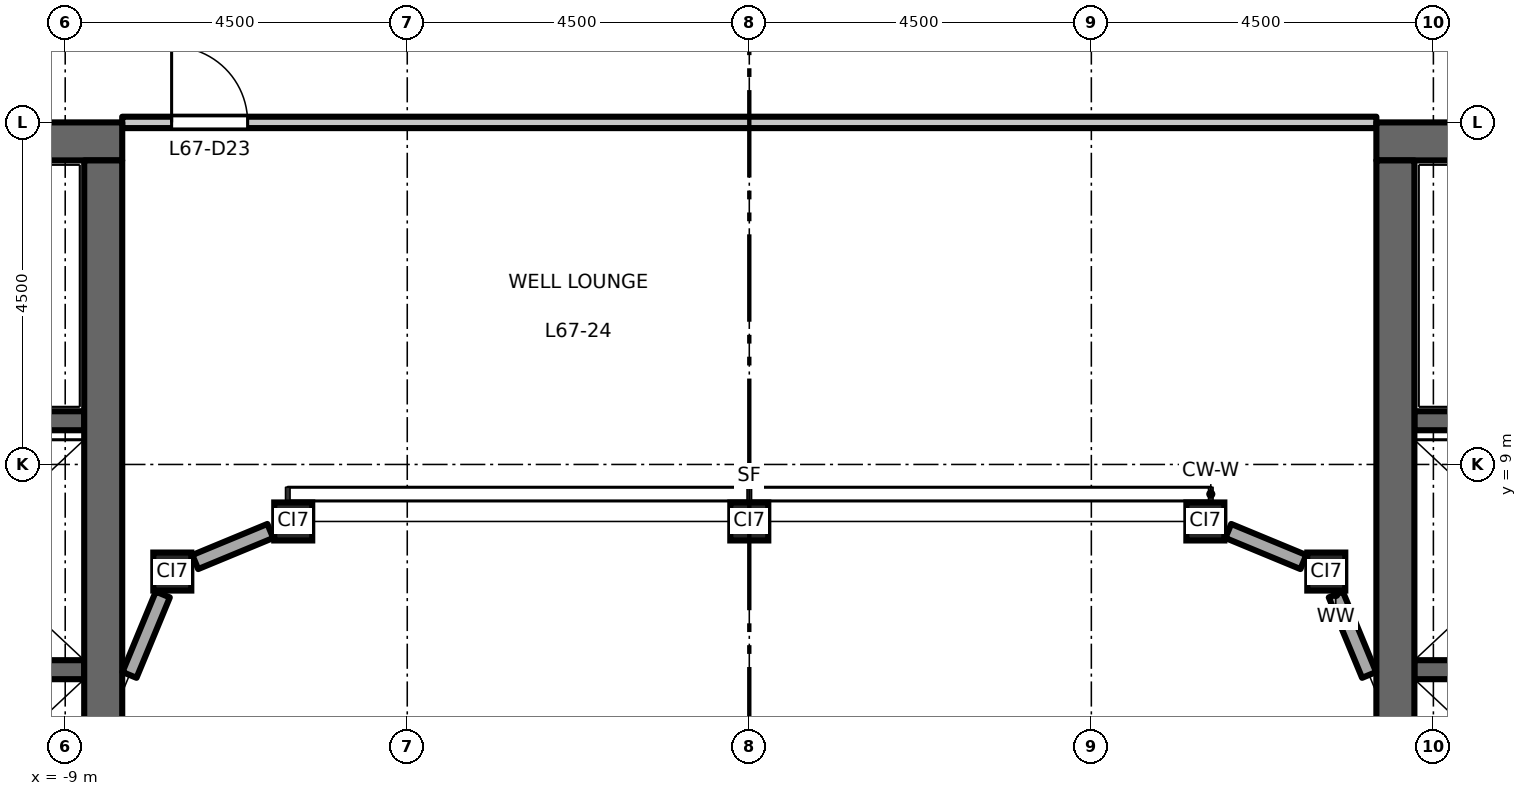
"""IFC4 building model, lengths in metres.
Left out: names, types, materials, properties, quantities, classifications, styles, units other than length and angle.
Written with IfcOpenShell. Run it as: python <this file> out.ifc"""

import sys

from ifc_helpers import new_model, si_unit, direction, frame, frame_2d, origin, origin_2d, place, context, subcontext, project, spatial, rectangle, hollow_rectangle, extrude, element, fill, save


model = new_model("IFC4")
c1 = context("Model", 3, precision=1e-05, world=origin(), true_north=direction((0.0, 1.0)))
c2 = subcontext(c1, "Body", "Model", "MODEL_VIEW")
j1 = project(units=[si_unit("LENGTHUNIT", "METRE"), si_unit("PLANEANGLEUNIT", "RADIAN")], contexts=[c1])
p1 = place(None, origin())
s1 = spatial("IfcSite", under=j1, at=p1, CompositionType="ELEMENT")
p2 = place(p1, origin())
s2 = spatial("IfcBuilding", under=s1, at=p2, CompositionType="ELEMENT")
p3 = place(p2, frame((0.0, 0.0, 312.2)))
s3 = spatial("IfcBuildingStorey", under=s2, at=p3, CompositionType="ELEMENT", Elevation=312.2)
for number, where, z_axis, x_axis in (
    (1, (-7.591, 7.591, 0.0), (0.0, 0.0, 1.0), (1.0, 0.0, 0.0)),
    (2, (-6.0, 8.25, 0.0), (0.0, 0.0, 1.0), (1.0, 0.0, 0.0)),
    (3, (0.0, 8.25, 0.0), (0.0, 0.0, 1.0), (1.0, 0.0, 0.0)),
    (4, (6.0, 8.25, 0.0), (0.0, 0.0, 1.0), (1.0, 0.0, 0.0)),
    (5, (7.591, 7.591, 0.0), (0.0, 0.0, 1.0), (1.0, 0.0, 0.0)),
):
    element("IfcColumn", number, at=place(p3, frame(where, z_axis=z_axis, x_axis=x_axis)), inside=s3, PredefinedType="COLUMN", context=c2, shape_type="SweptSolid", body=[
        extrude(hollow_rectangle(XDim=0.5, YDim=0.5, WallThickness=0.025, at=origin_2d()), origin(), (0.0, 0.0, 1.0), 4.5),
    ])
p4 = place(p3, frame((-8.75, 6.3, 0.0), z_axis=(0.0, 0.0, 1.0), x_axis=(-1.0, 0.0, 0.0)))
e6 = element("IfcWall", 6, at=p4, inside=s3, PredefinedType="SHEAR", context=c2, shape_type="SweptSolid", body=[
    extrude(rectangle(XDim=3.1, YDim=0.25, at=frame_2d((1.55, 0.0))), origin(), (0.0, 0.0, 1.0), 4.35),
])
p5 = place(p3, frame((-8.75, 9.575, 0.0), z_axis=(0.0, 0.0, 1.0), x_axis=(-1.0, 0.0, 0.0)))
e7 = element("IfcWall", 7, at=p5, inside=s3, PredefinedType="SHEAR", context=c2, shape_type="SweptSolid", body=[
    extrude(rectangle(XDim=8.0, YDim=0.25, at=frame_2d((4.0, 0.0))), origin(), (0.0, 0.0, 1.0), 4.35),
])
p6 = place(p5, frame((6.65, 0.0, 0.0)))
e8 = element("IfcOpeningElement", 8, at=p6, cuts=e7, PredefinedType="OPENING", context=c2, shape_type="SweptSolid", body=[
    extrude(rectangle(XDim=1.1, YDim=2.1, at=frame_2d((0.55, 1.05))), frame((0.0, 0.135, 0.0), z_axis=(0.0, -1.0, 0.0), x_axis=(1.0, 0.0, 0.0)), (0.0, 0.0, 1.0), 0.27),
])
p7 = place(p3, frame((-8.25, 13.25, 0.0), z_axis=(0.0, 0.0, 1.0), x_axis=(-1.0, 0.0, 0.0)))
e9 = element("IfcWall", 9, at=p7, inside=s3, PredefinedType="SHEAR", context=c2, shape_type="SweptSolid", body=[
    extrude(rectangle(XDim=9.0, YDim=0.5, at=frame_2d((4.5, 0.0))), origin(), (0.0, 0.0, 1.0), 4.35),
])
p8 = place(p3, frame((-8.5, -13.0, 0.0), z_axis=(0.0, 0.0, 1.0), x_axis=(0.0, 1.0, 0.0)))
e10 = element("IfcWall", 10, at=p8, inside=s3, PredefinedType="SHEAR", context=c2, shape_type="SweptSolid", body=[
    extrude(rectangle(XDim=26.0, YDim=0.5, at=frame_2d((13.0, 0.0))), origin(), (0.0, 0.0, 1.0), 4.35),
])
p9 = place(p3, frame((8.75, 6.3, 0.0), z_axis=(0.0, 0.0, 1.0), x_axis=(1.0, 0.0, 0.0)))
e11 = element("IfcWall", 11, at=p9, inside=s3, PredefinedType="SHEAR", context=c2, shape_type="SweptSolid", body=[
    extrude(rectangle(XDim=3.1, YDim=0.25, at=frame_2d((1.55, 0.0))), origin(), (0.0, 0.0, 1.0), 4.35),
])
p10 = place(p3, frame((8.75, 9.575, 0.0), z_axis=(0.0, 0.0, 1.0), x_axis=(1.0, 0.0, 0.0)))
e12 = element("IfcWall", 12, at=p10, inside=s3, PredefinedType="SHEAR", context=c2, shape_type="SweptSolid", body=[
    extrude(rectangle(XDim=8.0, YDim=0.25, at=frame_2d((4.0, 0.0))), origin(), (0.0, 0.0, 1.0), 4.35),
])
p11 = place(p10, frame((6.65, 0.0, 0.0)))
e13 = element("IfcOpeningElement", 13, at=p11, cuts=e12, PredefinedType="OPENING", context=c2, shape_type="SweptSolid", body=[
    extrude(rectangle(XDim=1.1, YDim=2.1, at=frame_2d((0.55, 1.05))), frame((0.0, 0.135, 0.0), z_axis=(0.0, -1.0, 0.0), x_axis=(1.0, 0.0, 0.0)), (0.0, 0.0, 1.0), 0.27),
])
p12 = place(p3, frame((8.25, 13.25, 0.0), z_axis=(0.0, 0.0, 1.0), x_axis=(1.0, 0.0, 0.0)))
e14 = element("IfcWall", 14, at=p12, inside=s3, PredefinedType="SHEAR", context=c2, shape_type="SweptSolid", body=[
    extrude(rectangle(XDim=9.0, YDim=0.5, at=frame_2d((4.5, 0.0))), origin(), (0.0, 0.0, 1.0), 4.35),
])
p13 = place(p3, frame((8.5, -13.0, 0.0), z_axis=(0.0, 0.0, 1.0), x_axis=(0.0, 1.0, 0.0)))
e15 = element("IfcWall", 15, at=p13, inside=s3, PredefinedType="SHEAR", context=c2, shape_type="SweptSolid", body=[
    extrude(rectangle(XDim=26.0, YDim=0.5, at=frame_2d((13.0, 0.0))), origin(), (0.0, 0.0, 1.0), 4.35),
])
p14 = place(p3, frame((8.154, 6.231, 0.0), z_axis=(0.0, 0.0, 1.0), x_axis=(-0.382571404949, 0.923925927829, 0.0)))
e16 = element("IfcWall", 16, at=p14, inside=s3, PredefinedType="STANDARD", context=c2, shape_type="SweptSolid", body=[
    extrude(rectangle(XDim=1.146, YDim=0.2, at=frame_2d((0.573, 0.0))), origin(), (0.0, 0.0, 1.0), 4.01),
])
for number, where, z_axis, x_axis in (
    (17, (7.289, 7.716, 0.0), (0.0, 0.0, 1.0), (-0.924, 0.383, 0.0)),
    (18, (-6.302, 8.125, 0.0), (0.0, 0.0, 1.0), (-0.924, -0.383, 0.0)),
):
    element("IfcWall", number, at=place(p3, frame(where, z_axis=z_axis, x_axis=x_axis)), inside=s3, PredefinedType="STANDARD", context=c2, shape_type="SweptSolid", body=[
        extrude(rectangle(XDim=1.069, YDim=0.2, at=frame_2d((0.534, 0.0))), origin(), (0.0, 0.0, 1.0), 4.01),
    ])
p15 = place(p3, frame((-7.716, 7.289, 0.0), z_axis=(0.0, 0.0, 1.0), x_axis=(-0.382571404949, -0.923925927829, 0.0)))
e19 = element("IfcWall", 19, at=p15, inside=s3, PredefinedType="STANDARD", context=c2, shape_type="SweptSolid", body=[
    extrude(rectangle(XDim=1.146, YDim=0.2, at=frame_2d((0.573, 0.0))), origin(), (0.0, 0.0, 1.0), 4.01),
])
p16 = place(p3, frame((-8.25, 13.5, 0.0), z_axis=(0.0, 0.0, 1.0), x_axis=(1.0, 0.0, 0.0)))
e20 = element("IfcWall", 20, at=p16, inside=s3, PredefinedType="PARTITIONING", context=c2, shape_type="SweptSolid", body=[
    extrude(rectangle(XDim=16.5, YDim=0.15, at=frame_2d((8.25, 0.0))), origin(), (0.0, 0.0, 1.0), 4.35),
])
p17 = place(p16, frame((0.65, 0.0, 0.0)))
e21 = element("IfcOpeningElement", 21, at=p17, cuts=e20, PredefinedType="OPENING", context=c2, shape_type="SweptSolid", body=[
    extrude(rectangle(XDim=1.0, YDim=2.1, at=frame_2d((0.5, 1.05))), frame((0.0, 0.085, 0.0), z_axis=(0.0, -1.0, 0.0), x_axis=(1.0, 0.0, 0.0)), (0.0, 0.0, 1.0), 0.17),
])
p18 = place(p17, origin())
e22 = element("IfcDoor", 22, at=p18, inside=s3, OperationType="SINGLE_SWING_LEFT", PredefinedType="DOOR", context=c2, shape_type="SweptSolid", body=[
    extrude(rectangle(XDim=1.0, YDim=2.1, at=frame_2d((0.5, 1.05))), frame((0.0, 0.025, 0.0), z_axis=(0.0, -1.0, 0.0), x_axis=(1.0, 0.0, 0.0)), (0.0, 0.0, 1.0), 0.05),
])
fill(e21, e22)
save(model, sys.argv[1])
